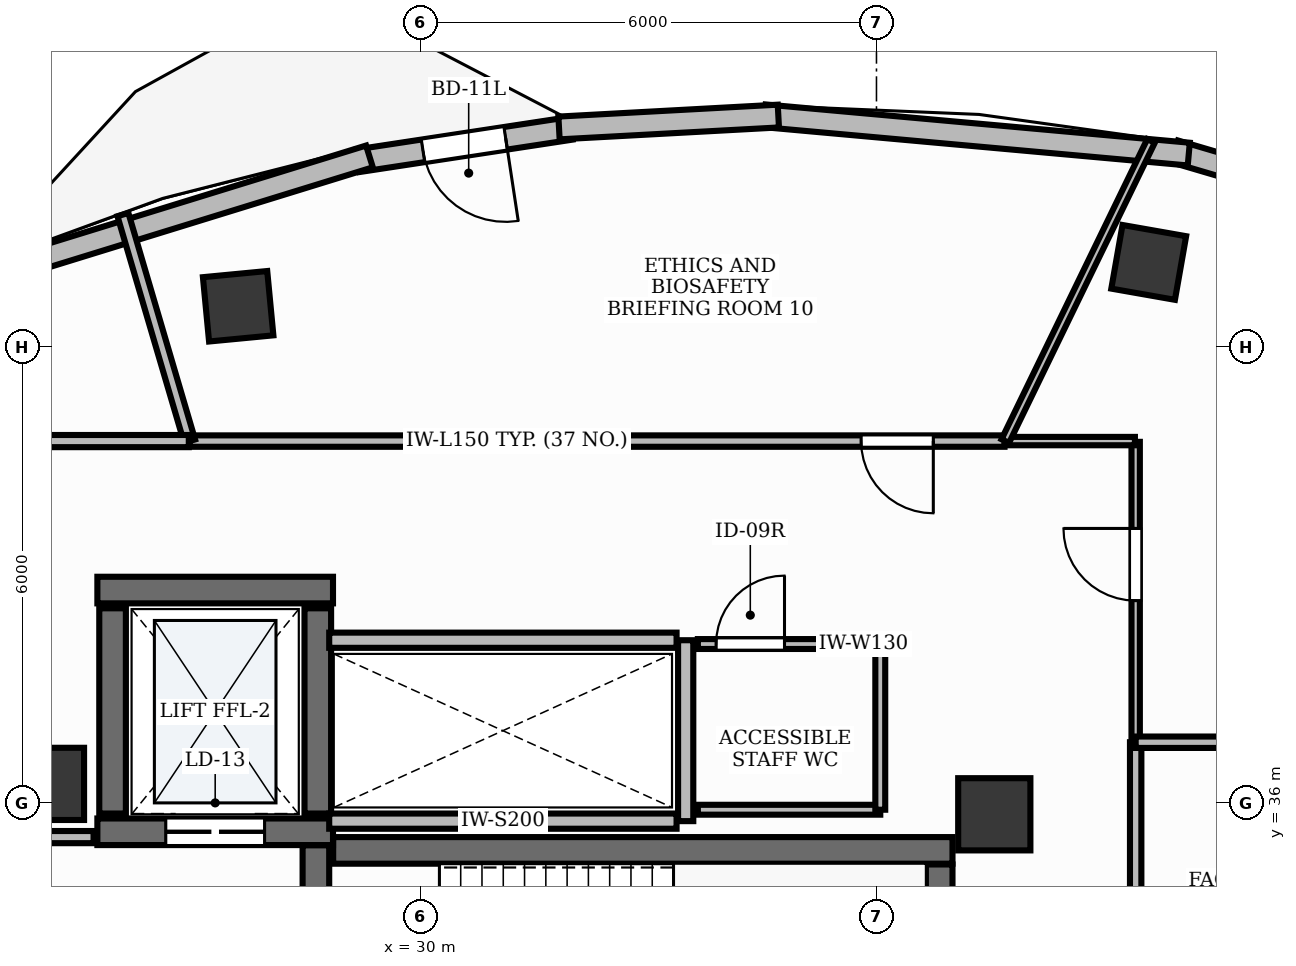
"""IFC4 building model, lengths in metres.
Left out: names, types, materials, properties, quantities, classifications, styles, units other than length and angle.
Written with IfcOpenShell. Run it as: python <this file> out.ifc"""

import sys

from ifc_helpers import new_model, si_unit, direction, frame, frame_2d, origin, origin_2d, place, context, subcontext, project, spatial, rectangle, extrude, element, fill, save


model = new_model("IFC4")
c1 = context("Model", 3, precision=1e-05, world=origin(), true_north=direction((0.0, 1.0)))
c2 = subcontext(c1, "Body", "Model", "MODEL_VIEW")
j1 = project(units=[si_unit("LENGTHUNIT", "METRE"), si_unit("PLANEANGLEUNIT", "RADIAN")], contexts=[c1])
p1 = place(None, origin())
s1 = spatial("IfcSite", under=j1, at=p1, CompositionType="ELEMENT")
p2 = place(p1, origin())
s2 = spatial("IfcBuilding", under=s1, at=p2, CompositionType="ELEMENT")
p3 = place(p2, frame((0.0, 0.0, 310.2)))
s3 = spatial("IfcBuildingStorey", under=s2, at=p3, CompositionType="ELEMENT", Elevation=310.2)
p4 = place(p3, frame((28.852, 35.375, 0.0), z_axis=(0.0, 0.0, 1.0), x_axis=(1.0, 0.0, 0.0)))
e1 = element("IfcWall", 1, at=p4, inside=s3, PredefinedType="SHEAR", context=c2, shape_type="SweptSolid", body=[
    extrude(rectangle(XDim=8.148, YDim=0.35, at=frame_2d((4.074, 0.0))), origin(), (0.0, 0.0, 1.0), 3.9),
])
p5 = place(p3, frame((36.825, 32.11, 0.0), z_axis=(0.0, 0.0, 1.0), x_axis=(0.0, 1.0, 0.0)))
e2 = element("IfcWall", 2, at=p5, inside=s3, PredefinedType="SHEAR", context=c2, shape_type="SweptSolid", body=[
    extrude(rectangle(XDim=3.08, YDim=0.35, at=frame_2d((1.54, 0.0))), origin(), (0.0, 0.0, 1.0), 3.9),
])
p6 = place(p3, frame((28.625, 32.11, 0.0), z_axis=(0.0, 0.0, 1.0), x_axis=(0.0, 1.0, 0.0)))
e3 = element("IfcWall", 3, at=p6, inside=s3, PredefinedType="SHEAR", context=c2, shape_type="SweptSolid", body=[
    extrude(rectangle(XDim=3.333, YDim=0.35, at=frame_2d((1.667, 0.0))), origin(), (0.0, 0.0, 1.0), 3.9),
])
p7 = place(p6, frame((0.2, 0.0, 0.0)))
e4 = element("IfcOpeningElement", 4, at=p7, cuts=e3, PredefinedType="OPENING", context=c2, shape_type="SweptSolid", body=[
    extrude(rectangle(XDim=1.05, YDim=2.15, at=frame_2d((0.525, 1.075))), frame((0.0, 0.19, 0.0), z_axis=(0.0, -1.0, 0.0), x_axis=(1.0, 0.0, 0.0)), (0.0, 0.0, 1.0), 0.38),
])
p8 = place(p3, frame((25.75, 38.8, 0.0), z_axis=(0.0, 0.0, 1.0), x_axis=(1.0, 0.0, 0.0)))
e5 = element("IfcWall", 5, at=p8, inside=s3, PredefinedType="SHEAR", context=c2, shape_type="SweptSolid", body=[
    extrude(rectangle(XDim=3.1, YDim=0.35, at=frame_2d((1.55, 0.0))), origin(), (0.0, 0.0, 1.0), 3.9),
])
p9 = place(p3, frame((25.75, 35.62, 0.0), z_axis=(0.0, 0.0, 1.0), x_axis=(1.0, 0.0, 0.0)))
e6 = element("IfcWall", 6, at=p9, inside=s3, PredefinedType="SHEAR", context=c2, shape_type="SweptSolid", body=[
    extrude(rectangle(XDim=3.1, YDim=0.35, at=frame_2d((1.55, 0.0))), origin(), (0.0, 0.0, 1.0), 3.9),
])
p10 = place(p9, frame((0.9, 0.0, 0.0)))
e7 = element("IfcOpeningElement", 7, at=p10, cuts=e6, PredefinedType="OPENING", context=c2, shape_type="SweptSolid", body=[
    extrude(rectangle(XDim=1.3, YDim=2.2, at=frame_2d((0.65, 1.1))), frame((0.0, 0.19, 0.0), z_axis=(0.0, -1.0, 0.0), x_axis=(1.0, 0.0, 0.0)), (0.0, 0.0, 1.0), 0.38),
])
for number, where, z_axis, x_axis in (
    (8, (25.95, 35.86, 0.0), (0.0, 0.0, 1.0), (0.0, 1.0, 0.0)),
    (9, (28.65, 35.86, 0.0), (0.0, 0.0, 1.0), (0.0, 1.0, 0.0)),
):
    element("IfcWall", number, at=place(p3, frame(where, z_axis=z_axis, x_axis=x_axis)), inside=s3, PredefinedType="SHEAR", context=c2, shape_type="SweptSolid", body=[
        extrude(rectangle(XDim=2.7, YDim=0.35, at=frame_2d((1.35, 0.0))), origin(), (0.0, 0.0, 1.0), 3.9),
    ])
for number, where, z_axis, x_axis in (
    (10, (37.55, 35.85, -0.0), (0.0, 0.0, 1.0), (1.0, 0.0, 0.0)),
    (11, (25.1, 36.25, -0.0), (0.0, 0.0, 1.0), (1.0, 0.0, 0.0)),
):
    element("IfcColumn", number, at=place(p3, frame(where, z_axis=z_axis, x_axis=x_axis)), inside=s3, PredefinedType="PILASTER", context=c2, shape_type="SweptSolid", body=[
        extrude(rectangle(XDim=0.95, YDim=0.95, at=origin_2d()), origin(), (0.0, 0.0, 1.0), 3.901),
    ])
for number, where, z_axis, x_axis in (
    (12, (39.582, 43.111, -0.0), (0.0, 0.0, 1.0), (-0.985, 0.173, 0.0)),
    (13, (27.602, 42.534, -0.0), (0.0, 0.0, 1.0), (0.995, 0.095, 0.0)),
):
    element("IfcColumn", number, at=place(p3, frame(where, z_axis=z_axis, x_axis=x_axis)), inside=s3, PredefinedType="COLUMN", context=c2, shape_type="SweptSolid", body=[
        extrude(rectangle(XDim=0.85, YDim=0.85, at=origin_2d()), origin(), (0.0, 0.0, 1.0), 3.901),
    ])
p11 = place(p3, frame((31.979, 44.874, 0.0), z_axis=(0.0, 0.0, 1.0), x_axis=(-0.988616331056, -0.150458465925, 0.0)))
e14 = element("IfcWall", 14, at=p11, inside=s3, PredefinedType="STANDARD", context=c2, shape_type="SweptSolid", body=[
    extrude(rectangle(XDim=2.835, YDim=0.3, at=frame_2d((1.417, 0.0))), origin(), (0.0, 0.0, 1.0), 3.47),
])
p12 = place(p11, frame((0.867, 0.0, 0.0)))
e15 = element("IfcOpeningElement", 15, at=p12, cuts=e14, PredefinedType="OPENING", context=c2, shape_type="SweptSolid", body=[
    extrude(rectangle(XDim=1.1, YDim=2.15, at=frame_2d((0.55, 1.075))), frame((0.0, 0.165, 0.0), z_axis=(0.0, -1.0, 0.0), x_axis=(1.0, 0.0, 0.0)), (0.0, 0.0, 1.0), 0.33),
])
p13 = place(p3, frame((45.197, 43.018, 0.0), z_axis=(0.0, 0.0, 1.0), x_axis=(-0.959276315934, 0.282469378321, 0.0)))
e16 = element("IfcWall", 16, at=p13, inside=s3, PredefinedType="STANDARD", context=c2, shape_type="SweptSolid", body=[
    extrude(rectangle(XDim=5.495, YDim=0.3, at=frame_2d((2.748, 0.0))), origin(), (0.0, 0.0, 1.0), 3.9),
])
p14 = place(p3, frame((40.109, 44.536, 0.0), z_axis=(0.0, 0.0, 1.0), x_axis=(-0.995950163058, 0.089907022552, 0.0)))
e17 = element("IfcWall", 17, at=p14, inside=s3, PredefinedType="STANDARD", context=c2, shape_type="SweptSolid", body=[
    extrude(rectangle(XDim=5.602, YDim=0.3, at=frame_2d((2.801, 0.0))), origin(), (0.0, 0.0, 1.0), 3.9),
])
p15 = place(p3, frame((34.709, 45.036, 0.0), z_axis=(0.0, 0.0, 1.0), x_axis=(-0.998532534801, -0.054155119283, 0.0)))
e18 = element("IfcWall", 18, at=p15, inside=s3, PredefinedType="STANDARD", context=c2, shape_type="SweptSolid", body=[
    extrude(rectangle(XDim=2.89, YDim=0.3, at=frame_2d((1.445, 0.0))), origin(), (0.0, 0.0, 1.0), 3.9),
])
p16 = place(p3, frame((29.33, 44.505, 0.0), z_axis=(0.0, 0.0, 1.0), x_axis=(-0.955535200816, -0.29487705913, 0.0)))
e19 = element("IfcWall", 19, at=p16, inside=s3, PredefinedType="STANDARD", context=c2, shape_type="SweptSolid", body=[
    extrude(rectangle(XDim=5.485, YDim=0.3, at=frame_2d((2.743, 0.0))), origin(), (0.0, 0.0, 1.0), 3.47),
])
p17 = place(p3, frame((33.49, 35.76, 0.0), z_axis=(0.0, 0.0, 1.0), x_axis=(0.0, 1.0, 0.0)))
e20 = element("IfcWall", 20, at=p17, inside=s3, PredefinedType="PARTITIONING", context=c2, shape_type="SweptSolid", body=[
    extrude(rectangle(XDim=2.38, YDim=0.2, at=frame_2d((1.19, 0.0))), origin(), (0.0, 0.0, 1.0), 2.91),
])
for number, where, z_axis, x_axis in (
    (21, (28.8, 35.76, 0.0), (0.0, 0.0, 1.0), (1.0, 0.0, 0.0)),
    (22, (28.8, 38.14, 0.0), (0.0, 0.0, 1.0), (1.0, 0.0, 0.0)),
):
    element("IfcWall", number, at=place(p3, frame(where, z_axis=z_axis, x_axis=x_axis)), inside=s3, PredefinedType="PARTITIONING", context=c2, shape_type="SweptSolid", body=[
        extrude(rectangle(XDim=4.57, YDim=0.2, at=frame_2d((2.285, 0.0))), origin(), (0.0, 0.0, 1.0), 2.91),
    ])
p18 = place(p3, frame((23.58, 35.55, 0.0), z_axis=(0.0, 0.0, 1.0), x_axis=(1.0, 0.0, 0.0)))
e23 = element("IfcWall", 23, at=p18, inside=s3, PredefinedType="PARTITIONING", context=c2, shape_type="SweptSolid", body=[
    extrude(rectangle(XDim=2.12, YDim=0.16, at=frame_2d((1.06, 0.0))), origin(), (0.0, 0.0, 1.0), 2.91),
])
p19 = place(p3, frame((33.65, 38.09, 0.0), z_axis=(0.0, 0.0, 1.0), x_axis=(1.0, 0.0, 0.0)))
e24 = element("IfcWall", 24, at=p19, inside=s3, PredefinedType="PARTITIONING", context=c2, shape_type="SweptSolid", body=[
    extrude(rectangle(XDim=2.4, YDim=0.13, at=frame_2d((1.2, 0.0))), origin(), (0.0, 0.0, 1.0), 2.91),
])
p20 = place(p19, frame((0.24, 0.0, 0.0)))
e25 = element("IfcOpeningElement", 25, at=p20, cuts=e24, PredefinedType="OPENING", context=c2, shape_type="SweptSolid", body=[
    extrude(rectangle(XDim=0.9, YDim=2.15, at=frame_2d((0.45, 1.075))), frame((0.0, 0.08, 0.0), z_axis=(0.0, -1.0, 0.0), x_axis=(1.0, 0.0, 0.0)), (0.0, 0.0, 1.0), 0.16),
])
p21 = place(p3, frame((39.41, 31.494, 0.0), z_axis=(0.0, 0.0, 1.0), x_axis=(0.0, 1.0, 0.0)))
e26 = element("IfcWall", 26, at=p21, inside=s3, PredefinedType="PARTITIONING", context=c2, shape_type="SweptSolid", body=[
    extrude(rectangle(XDim=5.304, YDim=0.15, at=frame_2d((2.652, 0.0))), origin(), (0.0, 0.0, 1.0), 2.91),
])
p22 = place(p21, frame((0.812, 0.0, 0.0)))
e27 = element("IfcOpeningElement", 27, at=p22, cuts=e26, PredefinedType="OPENING", context=c2, shape_type="SweptSolid", body=[
    extrude(rectangle(XDim=0.95, YDim=2.15, at=frame_2d((0.475, 1.075))), frame((0.0, 0.09, 0.0), z_axis=(0.0, -1.0, 0.0), x_axis=(1.0, 0.0, 0.0)), (0.0, 0.0, 1.0), 0.18),
])
p23 = place(p3, frame((39.41, 36.808, 0.0), z_axis=(0.0, 0.0, 1.0), x_axis=(0.0, 1.0, 0.0)))
e28 = element("IfcWall", 28, at=p23, inside=s3, PredefinedType="MOVABLE", context=c2, shape_type="SweptSolid", body=[
    extrude(rectangle(XDim=3.942, YDim=0.11, at=frame_2d((1.971, 0.0))), origin(), (0.0, 0.0, 1.0), 2.91),
])
p24 = place(p23, frame((1.853, 0.0, 0.0)))
e29 = element("IfcOpeningElement", 29, at=p24, cuts=e28, PredefinedType="OPENING", context=c2, shape_type="SweptSolid", body=[
    extrude(rectangle(XDim=0.95, YDim=2.15, at=frame_2d((0.475, 1.075))), frame((0.0, 0.07, 0.0), z_axis=(0.0, -1.0, 0.0), x_axis=(1.0, 0.0, 0.0)), (0.0, 0.0, 1.0), 0.14),
])
p25 = place(p3, frame((37.685, 40.76, 0.0), z_axis=(0.0, 0.0, 1.0), x_axis=(-1.0, 0.0, 0.0)))
e30 = element("IfcWall", 30, at=p25, inside=s3, PredefinedType="PARTITIONING", context=c2, shape_type="SweptSolid", body=[
    extrude(rectangle(XDim=10.721, YDim=0.15, at=frame_2d((5.361, 0.0))), origin(), (0.0, 0.0, 1.0), 2.91),
])
p26 = place(p25, frame((0.937, 0.0, 0.0)))
e31 = element("IfcOpeningElement", 31, at=p26, cuts=e30, PredefinedType="OPENING", context=c2, shape_type="SweptSolid", body=[
    extrude(rectangle(XDim=0.95, YDim=2.15, at=frame_2d((0.475, 1.075))), frame((0.0, 0.09, 0.0), z_axis=(0.0, -1.0, 0.0), x_axis=(1.0, 0.0, 0.0)), (0.0, 0.0, 1.0), 0.18),
])
p27 = place(p3, frame((36.05, 35.91, 0.0), z_axis=(0.0, 0.0, 1.0), x_axis=(-1.0, 0.0, 0.0)))
e32 = element("IfcWall", 32, at=p27, inside=s3, PredefinedType="PARTITIONING", context=c2, shape_type="SweptSolid", body=[
    extrude(rectangle(XDim=2.4, YDim=0.13, at=frame_2d((1.2, 0.0))), origin(), (0.0, 0.0, 1.0), 2.91),
])
p28 = place(p3, frame((36.05, 38.09, 0.0), z_axis=(0.0, 0.0, 1.0), x_axis=(0.0, -1.0, 0.0)))
e33 = element("IfcWall", 33, at=p28, inside=s3, PredefinedType="PARTITIONING", context=c2, shape_type="SweptSolid", body=[
    extrude(rectangle(XDim=2.18, YDim=0.13, at=frame_2d((1.09, 0.0))), origin(), (0.0, 0.0, 1.0), 2.91),
])
p29 = place(p3, frame((39.41, 36.798, 0.0), z_axis=(0.0, 0.0, 1.0), x_axis=(1.0, 0.0, 0.0)))
e34 = element("IfcWall", 34, at=p29, inside=s3, PredefinedType="PARTITIONING", context=c2, shape_type="SweptSolid", body=[
    extrude(rectangle(XDim=3.788, YDim=0.15, at=frame_2d((1.894, 0.0))), origin(), (0.0, 0.0, 1.0), 2.91),
])
p30 = place(p3, frame((39.4, 40.76, 0.0), z_axis=(0.0, 0.0, 1.0), x_axis=(-1.0, 0.0, 0.0)))
e35 = element("IfcWall", 35, at=p30, inside=s3, PredefinedType="MOVABLE", context=c2, shape_type="SweptSolid", body=[
    extrude(rectangle(XDim=1.705, YDim=0.11, at=frame_2d((0.853, 0.0))), origin(), (0.0, 0.0, 1.0), 2.91),
])
p31 = place(p3, frame((37.695, 40.76, 0.0), z_axis=(0.0, 0.0, 1.0), x_axis=(0.436838385981, 0.899540007189, 0.0)))
e36 = element("IfcWall", 36, at=p31, inside=s3, PredefinedType="MOVABLE", context=c2, shape_type="SweptSolid", body=[
    extrude(rectangle(XDim=4.389, YDim=0.11, at=frame_2d((2.195, 0.0))), origin(), (0.0, 0.0, 1.0), 2.91),
])
p32 = place(p3, frame((26.963, 40.76, 0.0), z_axis=(0.0, 0.0, 1.0), x_axis=(-0.282332281552, 0.959316674927, 0.0)))
e37 = element("IfcWall", 37, at=p32, inside=s3, PredefinedType="PARTITIONING", context=c2, shape_type="SweptSolid", body=[
    extrude(rectangle(XDim=3.106, YDim=0.15, at=frame_2d((1.553, 0.0))), origin(), (0.0, 0.0, 1.0), 2.91),
])
p33 = place(p3, frame((26.953, 40.76, 0.0), z_axis=(0.0, 0.0, 1.0), x_axis=(-1.0, 0.0, 0.0)))
e38 = element("IfcWall", 38, at=p33, inside=s3, PredefinedType="PARTITIONING", context=c2, shape_type="SweptSolid", body=[
    extrude(rectangle(XDim=5.153, YDim=0.16, at=frame_2d((2.576, 0.0))), origin(), (0.0, 0.0, 1.0), 2.91),
])
p34 = place(p12, origin())
e39 = element("IfcDoor", 39, at=p34, inside=s3, OperationType="SINGLE_SWING_LEFT", PredefinedType="DOOR", context=c2, shape_type="SweptSolid", body=[
    extrude(rectangle(XDim=1.1, YDim=2.15, at=frame_2d((0.55, 1.075))), frame((0.0, 0.025, 0.0), z_axis=(0.0, -1.0, 0.0), x_axis=(1.0, 0.0, 0.0)), (0.0, 0.0, 1.0), 0.05),
])
fill(e15, e39)
p35 = place(p10, origin())
e40 = element("IfcDoor", 40, at=p35, inside=s3, OperationType="DOUBLE_DOOR_SLIDING", PredefinedType="DOOR", context=c2, shape_type="SweptSolid", body=[
    extrude(rectangle(XDim=1.3, YDim=2.2, at=frame_2d((0.65, 1.1))), frame((0.0, 0.025, 0.0), z_axis=(0.0, -1.0, 0.0), x_axis=(1.0, 0.0, 0.0)), (0.0, 0.0, 1.0), 0.05),
])
fill(e7, e40)
p36 = place(p20, origin())
e41 = element("IfcDoor", 41, at=p36, inside=s3, OperationType="SINGLE_SWING_RIGHT", PredefinedType="DOOR", context=c2, shape_type="SweptSolid", body=[
    extrude(rectangle(XDim=0.9, YDim=2.15, at=frame_2d((0.45, 1.075))), frame((0.0, 0.025, 0.0), z_axis=(0.0, -1.0, 0.0), x_axis=(1.0, 0.0, 0.0)), (0.0, 0.0, 1.0), 0.05),
])
fill(e25, e41)
p37 = place(p24, origin())
e42 = element("IfcDoor", 42, at=p37, inside=s3, OperationType="SINGLE_SWING_RIGHT", PredefinedType="DOOR", context=c2, shape_type="SweptSolid", body=[
    extrude(rectangle(XDim=0.95, YDim=2.15, at=frame_2d((0.475, 1.075))), frame((0.0, 0.025, 0.0), z_axis=(0.0, -1.0, 0.0), x_axis=(1.0, 0.0, 0.0)), (0.0, 0.0, 1.0), 0.05),
])
fill(e29, e42)
p38 = place(p26, origin())
e43 = element("IfcDoor", 43, at=p38, inside=s3, OperationType="SINGLE_SWING_LEFT", PredefinedType="DOOR", context=c2, shape_type="SweptSolid", body=[
    extrude(rectangle(XDim=0.95, YDim=2.15, at=frame_2d((0.475, 1.075))), frame((0.0, 0.025, 0.0), z_axis=(0.0, -1.0, 0.0), x_axis=(1.0, 0.0, 0.0)), (0.0, 0.0, 1.0), 0.05),
])
fill(e31, e43)
save(model, sys.argv[1])
